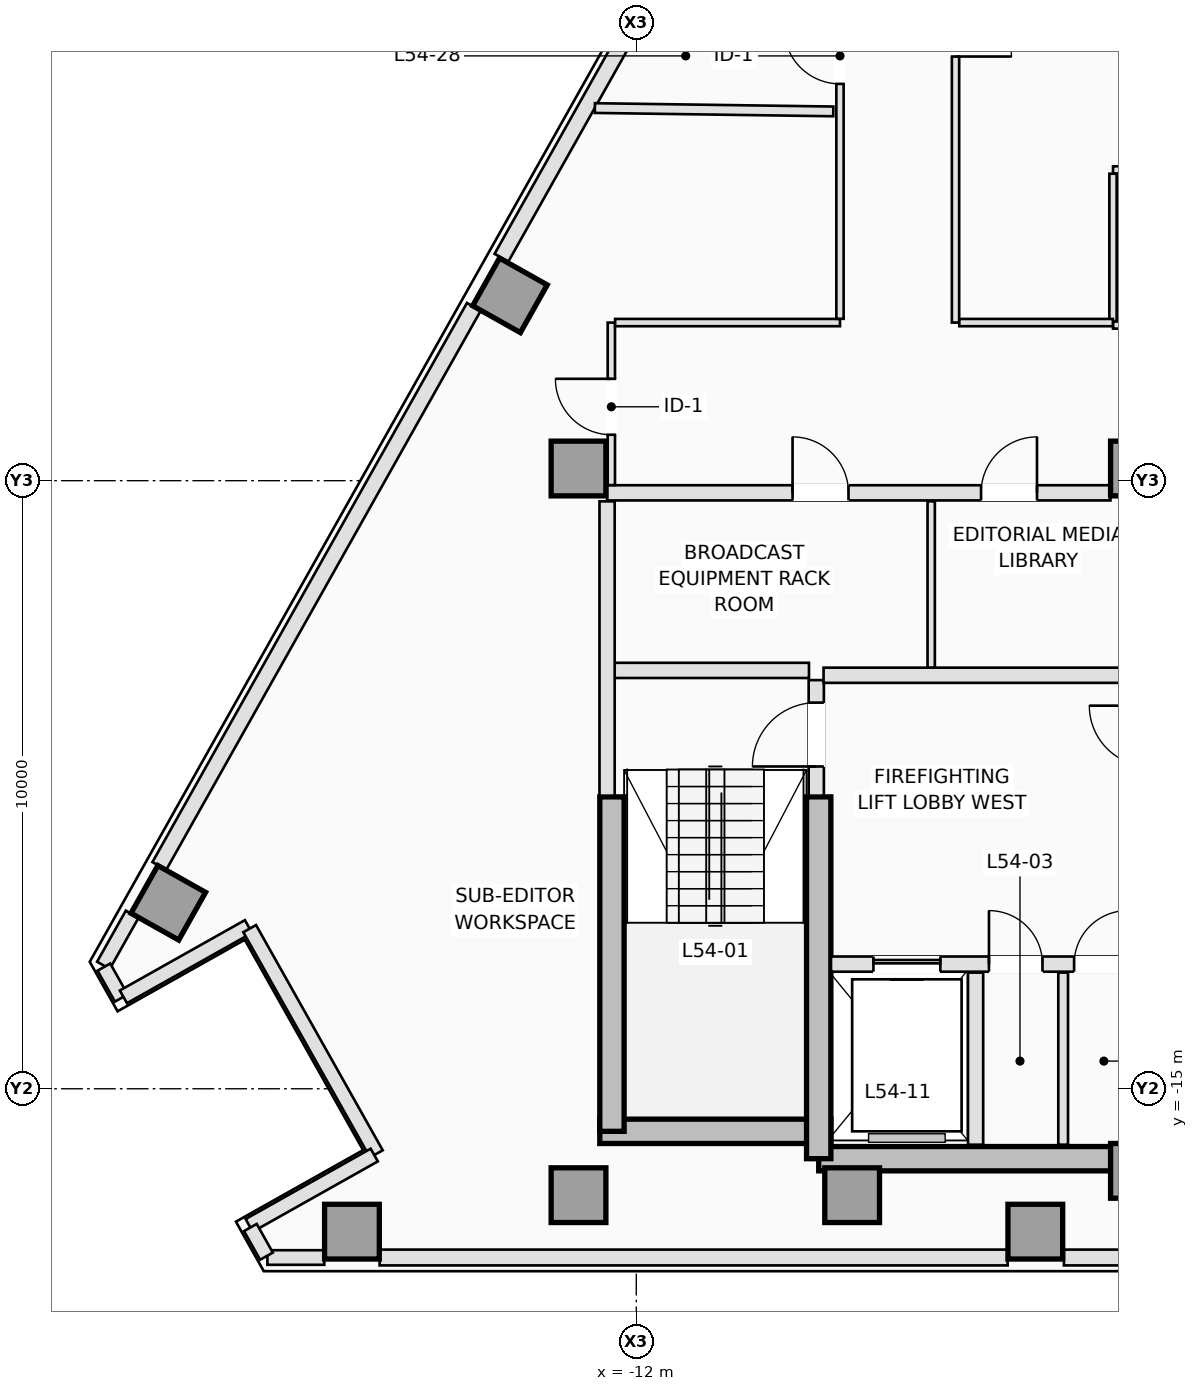
"""IFC4 building model, lengths in metres.
Left out: names, types, materials, properties, quantities, classifications, styles, units other than length and angle.
Written with IfcOpenShell. Run it as: python <this file> out.ifc"""

import sys

from ifc_helpers import new_model, si_unit, direction, frame, frame_2d, origin, origin_2d, place, context, subcontext, project, spatial, rectangle, extrude, element, fill, save


model = new_model("IFC4")
c1 = context("Model", 3, precision=1e-05, world=origin(), true_north=direction((0.0, 1.0)))
c2 = subcontext(c1, "Body", "Model", "MODEL_VIEW")
j1 = project(units=[si_unit("LENGTHUNIT", "METRE"), si_unit("PLANEANGLEUNIT", "RADIAN")], contexts=[c1])
p1 = place(None, origin())
s1 = spatial("IfcSite", under=j1, at=p1, CompositionType="ELEMENT")
p2 = place(p1, origin())
s2 = spatial("IfcBuilding", under=s1, at=p2, CompositionType="ELEMENT")
p3 = place(p2, frame((0.0, 0.0, 197.4)))
s3 = spatial("IfcBuildingStorey", under=s2, at=p3, CompositionType="ELEMENT", Elevation=197.4)
p4 = place(p3, frame((-12.6, -15.7, 0.0), z_axis=(0.0, 0.0, 1.0), x_axis=(1.0, 0.0, 0.0)))
e1 = element("IfcWall", 1, at=p4, inside=s3, PredefinedType="SHEAR", context=c2, shape_type="SweptSolid", body=[
    extrude(rectangle(XDim=3.8, YDim=0.4, at=frame_2d((1.9, 0.0))), origin(), (0.0, 0.0, 1.0), 3.5),
])
p5 = place(p3, frame((-9.0, -16.15, 0.0), z_axis=(0.0, 0.0, 1.0), x_axis=(1.0, 0.0, 0.0)))
e2 = element("IfcWall", 2, at=p5, inside=s3, PredefinedType="SHEAR", context=c2, shape_type="SweptSolid", body=[
    extrude(rectangle(XDim=5.25, YDim=0.4, at=frame_2d((2.625, 0.0))), origin(), (0.0, 0.0, 1.0), 3.5),
])
p6 = place(p3, frame((-12.4, -15.7, 0.0), z_axis=(0.0, 0.0, 1.0), x_axis=(0.0, 1.0, 0.0)))
e3 = element("IfcWall", 3, at=p6, inside=s3, PredefinedType="SHEAR", context=c2, shape_type="SweptSolid", body=[
    extrude(rectangle(XDim=5.5, YDim=0.4, at=frame_2d((2.75, 0.0))), origin(), (0.0, 0.0, 1.0), 3.5),
])
p7 = place(p3, frame((-9.0, -16.15, 0.0), z_axis=(0.0, 0.0, 1.0), x_axis=(0.0, 1.0, 0.0)))
e4 = element("IfcWall", 4, at=p7, inside=s3, PredefinedType="SHEAR", context=c2, shape_type="SweptSolid", body=[
    extrude(rectangle(XDim=5.95, YDim=0.4, at=frame_2d((2.975, 0.0))), origin(), (0.0, 0.0, 1.0), 3.5),
])
for number, where, z_axis, x_axis in (
    (5, (-12.95, -16.75, 0.0), (0.0, 0.0, 1.0), (1.0, 0.0, 0.0)),
    (6, (-8.45, -16.75, 0.0), (0.0, 0.0, 1.0), (1.0, 0.0, 0.0)),
    (7, (-3.75, -16.35, 0.0), (0.0, 0.0, 1.0), (1.0, 0.0, 0.0)),
    (8, (-12.95, -4.8, 0.0), (0.0, 0.0, 1.0), (1.0, 0.0, 0.0)),
    (9, (-3.75, -4.8, 0.0), (0.0, 0.0, 1.0), (1.0, 0.0, 0.0)),
    (10, (-16.676, -17.35, 0.0), (0.0, 0.0, 1.0), (0.0, 1.0, 0.0)),
    (11, (-5.438, -17.35, 0.0), (0.0, 0.0, 1.0), (0.0, 1.0, 0.0)),
    (12, (-14.077, -1.952, 0.0), (0.0, 0.0, 1.0), (-0.872, 0.49, 0.0)),
    (13, (-19.697, -11.942, 0.0), (0.0, 0.0, 1.0), (-0.872, 0.49, 0.0)),
):
    element("IfcColumn", number, at=place(p3, frame(where, z_axis=z_axis, x_axis=x_axis)), inside=s3, PredefinedType="COLUMN", context=c2, shape_type="SweptSolid", body=[
        extrude(rectangle(XDim=0.9, YDim=0.9, at=origin_2d()), origin(), (0.0, 0.0, 1.0), 3.5),
    ])
p8 = place(p3, frame((-17.131, -17.775, 0.0), z_axis=(0.0, 0.0, 1.0), x_axis=(-1.0, 0.0, 0.0)))
e14 = element("IfcWall", 14, at=p8, inside=s3, PredefinedType="STANDARD", context=c2, shape_type="SweptSolid", body=[
    extrude(rectangle(XDim=0.935, YDim=0.24, at=frame_2d((0.468, 0.0))), origin(), (0.0, 0.0, 1.0), 3.25),
])
p9 = place(p3, frame((-5.893, -17.775, 0.0), z_axis=(0.0, 0.0, 1.0), x_axis=(-1.0, 0.0, 0.0)))
e15 = element("IfcWall", 15, at=p9, inside=s3, PredefinedType="STANDARD", context=c2, shape_type="SweptSolid", body=[
    extrude(rectangle(XDim=10.328, YDim=0.26, at=frame_2d((5.164, 0.0))), origin(), (0.0, 0.0, 1.0), 3.25),
])
p10 = place(p3, frame((-0.662, -17.775, 0.0), z_axis=(0.0, 0.0, 1.0), x_axis=(-1.0, 0.0, 0.0)))
e16 = element("IfcWall", 16, at=p10, inside=s3, PredefinedType="STANDARD", context=c2, shape_type="SweptSolid", body=[
    extrude(rectangle(XDim=4.305, YDim=0.26, at=frame_2d((2.153, 0.0))), origin(), (0.0, 0.0, 1.0), 3.25),
])
p11 = place(p3, frame((-20.762, -12.97, 0.0), z_axis=(0.0, 0.0, 1.0), x_axis=(0.490345412687, 0.87152818443, 0.0)))
e17 = element("IfcWall", 17, at=p11, inside=s3, PredefinedType="STANDARD", context=c2, shape_type="SweptSolid", body=[
    extrude(rectangle(XDim=0.964, YDim=0.24, at=frame_2d((0.482, 0.0))), origin(), (0.0, 0.0, 1.0), 3.25),
])
p12 = place(p3, frame((-19.844, -11.337, 0.0), z_axis=(0.0, 0.0, 1.0), x_axis=(0.490246958575, 0.871583570066, 0.0)))
e18 = element("IfcWall", 18, at=p12, inside=s3, PredefinedType="STANDARD", context=c2, shape_type="SweptSolid", body=[
    extrude(rectangle(XDim=10.552, YDim=0.26, at=frame_2d((5.276, 0.0))), origin(), (0.0, 0.0, 1.0), 3.25),
])
p13 = place(p3, frame((-14.217, -1.334, 0.0), z_axis=(0.0, 0.0, 1.0), x_axis=(0.490261239633, 0.871575537125, 0.0)))
e19 = element("IfcWall", 19, at=p13, inside=s3, PredefinedType="STANDARD", context=c2, shape_type="SweptSolid", body=[
    extrude(rectangle(XDim=4.388, YDim=0.26, at=frame_2d((2.194, 0.0))), origin(), (0.0, 0.0, 1.0), 3.25),
])
p14 = place(p3, frame((-20.755, -12.999, 0.0), z_axis=(0.0, 0.0, 1.0), x_axis=(0.490320776404, -0.871542045014, 0.0)))
e20 = element("IfcWall", 20, at=p14, inside=s3, PredefinedType="STANDARD", context=c2, shape_type="SweptSolid", body=[
    extrude(rectangle(XDim=0.584, YDim=0.24, at=frame_2d((0.292, 0.0))), origin(), (0.0, 0.0, 1.0), 3.25),
])
p15 = place(p3, frame((-20.434, -13.489, 0.0), z_axis=(0.0, 0.0, 1.0), x_axis=(0.871578299909, 0.490256327984, 0.0)))
e21 = element("IfcWall", 21, at=p15, inside=s3, PredefinedType="STANDARD", context=c2, shape_type="SweptSolid", body=[
    extrude(rectangle(XDim=2.36, YDim=0.24, at=frame_2d((1.18, 0.0))), origin(), (0.0, 0.0, 1.0), 3.25),
])
p16 = place(p3, frame((-18.358, -12.366, 0.0), z_axis=(0.0, 0.0, 1.0), x_axis=(0.49027487746, -0.871567865706, 0.0)))
e22 = element("IfcWall", 22, at=p16, inside=s3, PredefinedType="STANDARD", context=c2, shape_type="SweptSolid", body=[
    extrude(rectangle(XDim=4.25, YDim=0.24, at=frame_2d((2.125, 0.0))), origin(), (0.0, 0.0, 1.0), 2.722),
])
p17 = place(p3, frame((-16.309, -16.09, 0.0), z_axis=(0.0, 0.0, 1.0), x_axis=(-0.871578299909, -0.490256327984, 0.0)))
e23 = element("IfcWall", 23, at=p17, inside=s3, PredefinedType="STANDARD", context=c2, shape_type="SweptSolid", body=[
    extrude(rectangle(XDim=2.36, YDim=0.24, at=frame_2d((1.18, 0.0))), origin(), (0.0, 0.0, 1.0), 3.25),
])
p18 = place(p3, frame((-18.346, -17.282, 0.0), z_axis=(0.0, 0.0, 1.0), x_axis=(0.49038986747, -0.87150317147, 0.0)))
e24 = element("IfcWall", 24, at=p18, inside=s3, PredefinedType="STANDARD", context=c2, shape_type="SweptSolid", body=[
    extrude(rectangle(XDim=0.541, YDim=0.24, at=frame_2d((0.271, 0.0))), origin(), (0.0, 0.0, 1.0), 3.25),
])
p19 = place(p3, frame((-9.04, -10.18, 0.0), z_axis=(0.0, 0.0, 1.0), x_axis=(0.0, 1.0, 0.0)))
e25 = element("IfcWall", 25, at=p19, inside=s3, PredefinedType="PARTITIONING", context=c2, shape_type="SweptSolid", body=[
    extrude(rectangle(XDim=1.9, YDim=0.25, at=frame_2d((0.95, 0.0))), origin(), (0.0, 0.0, 1.0), 3.25),
])
p20 = place(p19, frame((0.48, 0.0, 0.0)))
e26 = element("IfcOpeningElement", 26, at=p20, cuts=e25, PredefinedType="OPENING", context=c2, shape_type="SweptSolid", body=[
    extrude(rectangle(XDim=1.05, YDim=2.15, at=frame_2d((0.525, 1.075))), frame((0.0, 0.135, 0.0), z_axis=(0.0, -1.0, 0.0), x_axis=(1.0, 0.0, 0.0)), (0.0, 0.0, 1.0), 0.27),
])
p21 = place(p3, frame((-12.38, -8.12, 0.0), z_axis=(0.0, 0.0, 1.0), x_axis=(1.0, 0.0, 0.0)))
e27 = element("IfcWall", 27, at=p21, inside=s3, PredefinedType="PARTITIONING", context=c2, shape_type="SweptSolid", body=[
    extrude(rectangle(XDim=3.22, YDim=0.25, at=frame_2d((1.61, 0.0))), origin(), (0.0, 0.0, 1.0), 3.25),
])
p22 = place(p3, frame((-12.48, -10.18, 0.0), z_axis=(0.0, 0.0, 1.0), x_axis=(0.0, 1.0, 0.0)))
e28 = element("IfcWall", 28, at=p22, inside=s3, PredefinedType="PARTITIONING", context=c2, shape_type="SweptSolid", body=[
    extrude(rectangle(XDim=4.84, YDim=0.25, at=frame_2d((2.42, 0.0))), origin(), (0.0, 0.0, 1.0), 3.25),
])
p23 = place(p3, frame((-8.798, -12.95, 0.0), z_axis=(0.0, 0.0, 1.0), x_axis=(1.0, 0.0, 0.0)))
e29 = element("IfcWall", 29, at=p23, inside=s3, PredefinedType="PARTITIONING", context=c2, shape_type="SweptSolid", body=[
    extrude(rectangle(XDim=5.118, YDim=0.25, at=frame_2d((2.559, 0.0))), origin(), (0.0, 0.0, 1.0), 3.25),
])
p24 = place(p23, frame((0.698, 0.0, 0.0)))
e30 = element("IfcOpeningElement", 30, at=p24, cuts=e29, PredefinedType="OPENING", context=c2, shape_type="SweptSolid", body=[
    extrude(rectangle(XDim=1.1, YDim=2.15, at=frame_2d((0.55, 1.075))), frame((0.0, 0.135, 0.0), z_axis=(0.0, -1.0, 0.0), x_axis=(1.0, 0.0, 0.0)), (0.0, 0.0, 1.0), 0.27),
])
p25 = place(p23, frame((2.598, 0.0, 0.0)))
e31 = element("IfcOpeningElement", 31, at=p25, cuts=e29, PredefinedType="OPENING", context=c2, shape_type="SweptSolid", body=[
    extrude(rectangle(XDim=0.88, YDim=2.1, at=frame_2d((0.44, 1.05))), frame((0.0, 0.135, 0.0), z_axis=(0.0, -1.0, 0.0), x_axis=(1.0, 0.0, 0.0)), (0.0, 0.0, 1.0), 0.27),
])
p26 = place(p23, frame((3.998, 0.0, 0.0)))
e32 = element("IfcOpeningElement", 32, at=p26, cuts=e29, PredefinedType="OPENING", context=c2, shape_type="SweptSolid", body=[
    extrude(rectangle(XDim=0.88, YDim=2.1, at=frame_2d((0.44, 1.05))), frame((0.0, 0.135, 0.0), z_axis=(0.0, -1.0, 0.0), x_axis=(1.0, 0.0, 0.0)), (0.0, 0.0, 1.0), 0.27),
])
p27 = place(p3, frame((-6.42, -15.92, 0.0), z_axis=(0.0, 0.0, 1.0), x_axis=(0.0, 1.0, 0.0)))
e33 = element("IfcWall", 33, at=p27, inside=s3, PredefinedType="PARTITIONING", context=c2, shape_type="SweptSolid", body=[
    extrude(rectangle(XDim=2.83, YDim=0.25, at=frame_2d((1.415, 0.0))), origin(), (0.0, 0.0, 1.0), 3.25),
])
p28 = place(p3, frame((-4.98, -15.92, 0.0), z_axis=(0.0, 0.0, 1.0), x_axis=(0.0, 1.0, 0.0)))
e34 = element("IfcWall", 34, at=p28, inside=s3, PredefinedType="PARTITIONING", context=c2, shape_type="SweptSolid", body=[
    extrude(rectangle(XDim=2.83, YDim=0.16, at=frame_2d((1.415, 0.0))), origin(), (0.0, 0.0, 1.0), 3.25),
])
p29 = place(p3, frame((-8.92, -8.2, 0.0), z_axis=(0.0, 0.0, 1.0), x_axis=(1.0, 0.0, 0.0)))
e35 = element("IfcWall", 35, at=p29, inside=s3, PredefinedType="PARTITIONING", context=c2, shape_type="SweptSolid", body=[
    extrude(rectangle(XDim=5.24, YDim=0.25, at=frame_2d((2.62, 0.0))), origin(), (0.0, 0.0, 1.0), 3.25),
])
p30 = place(p3, frame((-12.48, -5.2, 0.0), z_axis=(0.0, 0.0, 1.0), x_axis=(1.0, 0.0, 0.0)))
e36 = element("IfcWall", 36, at=p30, inside=s3, PredefinedType="PARTITIONING", context=c2, shape_type="SweptSolid", body=[
    extrude(rectangle(XDim=8.278, YDim=0.25, at=frame_2d((4.139, 0.0))), origin(), (0.0, 0.0, 1.0), 3.25),
])
p31 = place(p30, frame((3.05, 0.0, 0.0)))
e37 = element("IfcOpeningElement", 37, at=p31, cuts=e36, PredefinedType="OPENING", context=c2, shape_type="SweptSolid", body=[
    extrude(rectangle(XDim=0.92, YDim=2.12, at=frame_2d((0.46, 1.06))), frame((0.0, 0.135, 0.0), z_axis=(0.0, -1.0, 0.0), x_axis=(1.0, 0.0, 0.0)), (0.0, 0.0, 1.0), 0.27),
])
p32 = place(p30, frame((6.15, 0.0, 0.0)))
e38 = element("IfcOpeningElement", 38, at=p32, cuts=e36, PredefinedType="OPENING", context=c2, shape_type="SweptSolid", body=[
    extrude(rectangle(XDim=0.92, YDim=2.12, at=frame_2d((0.46, 1.06))), frame((0.0, 0.135, 0.0), z_axis=(0.0, -1.0, 0.0), x_axis=(1.0, 0.0, 0.0)), (0.0, 0.0, 1.0), 0.27),
])
p33 = place(p3, frame((-7.15, -8.073, 0.0), z_axis=(0.0, 0.0, 1.0), x_axis=(0.0, 1.0, 0.0)))
e39 = element("IfcWall", 39, at=p33, inside=s3, PredefinedType="PARTITIONING", context=c2, shape_type="SweptSolid", body=[
    extrude(rectangle(XDim=2.733, YDim=0.12, at=frame_2d((1.366, 0.0))), origin(), (0.0, 0.0, 1.0), 3.25),
])
p34 = place(p3, frame((-4.16, -2.44, 0.0), z_axis=(0.0, 0.0, 1.0), x_axis=(1.0, 0.0, 0.0)))
e40 = element("IfcWall", 40, at=p34, inside=s3, PredefinedType="PARTITIONING", context=c2, shape_type="SweptSolid", body=[
    extrude(rectangle(XDim=2.62, YDim=0.12, at=frame_2d((1.31, 0.0))), origin(), (0.0, 0.0, 1.0), 2.943),
])
p35 = place(p34, frame((0.82, 0.0, 0.0)))
e41 = element("IfcOpeningElement", 41, at=p35, cuts=e40, PredefinedType="OPENING", context=c2, shape_type="SweptSolid", body=[
    extrude(rectangle(XDim=0.9, YDim=2.12, at=frame_2d((0.45, 1.06))), frame((0.0, 0.07, 0.0), z_axis=(0.0, -1.0, 0.0), x_axis=(1.0, 0.0, 0.0)), (0.0, 0.0, 1.0), 0.14),
])
p36 = place(p3, frame((-4.16, 0.11, 0.0), z_axis=(0.0, 0.0, 1.0), x_axis=(1.0, 0.0, 0.0)))
e42 = element("IfcWall", 42, at=p36, inside=s3, PredefinedType="PARTITIONING", context=c2, shape_type="SweptSolid", body=[
    extrude(rectangle(XDim=2.62, YDim=0.12, at=frame_2d((1.31, 0.0))), origin(), (0.0, 0.0, 1.0), 3.25),
])
p37 = place(p3, frame((-4.16, -2.378, 0.0), z_axis=(0.0, 0.0, 1.0), x_axis=(0.0, 1.0, 0.0)))
e43 = element("IfcWall", 43, at=p37, inside=s3, PredefinedType="PARTITIONING", context=c2, shape_type="SweptSolid", body=[
    extrude(rectangle(XDim=2.426, YDim=0.12, at=frame_2d((1.213, 0.0))), origin(), (0.0, 0.0, 1.0), 3.25),
])
p38 = place(p3, frame((-12.41, -5.073, 0.0), z_axis=(0.0, 0.0, 1.0), x_axis=(0.0, 1.0, 0.0)))
e44 = element("IfcWall", 44, at=p38, inside=s3, PredefinedType="PARTITIONING", context=c2, shape_type="SweptSolid", body=[
    extrude(rectangle(XDim=2.673, YDim=0.12, at=frame_2d((1.336, 0.0))), origin(), (0.0, 0.0, 1.0), 3.25),
])
p39 = place(p38, frame((0.828, 0.0, 0.0)))
e45 = element("IfcOpeningElement", 45, at=p39, cuts=e44, PredefinedType="OPENING", context=c2, shape_type="SweptSolid", body=[
    extrude(rectangle(XDim=0.92, YDim=2.12, at=frame_2d((0.46, 1.06))), frame((0.0, 0.07, 0.0), z_axis=(0.0, -1.0, 0.0), x_axis=(1.0, 0.0, 0.0)), (0.0, 0.0, 1.0), 0.14),
])
p40 = place(p3, frame((-12.348, -2.4, 0.0), z_axis=(0.0, 0.0, 1.0), x_axis=(1.0, 0.0, 0.0)))
e46 = element("IfcWall", 46, at=p40, inside=s3, PredefinedType="PARTITIONING", context=c2, shape_type="SweptSolid", body=[
    extrude(rectangle(XDim=3.698, YDim=0.12, at=frame_2d((1.849, 0.0))), origin(), (0.0, 0.0, 1.0), 3.25),
])
p41 = place(p3, frame((-8.65, -2.338, 0.0), z_axis=(0.0, 0.0, 1.0), x_axis=(0.0, 1.0, 0.0)))
e47 = element("IfcWall", 47, at=p41, inside=s3, PredefinedType="PARTITIONING", context=c2, shape_type="SweptSolid", body=[
    extrude(rectangle(XDim=8.525, YDim=0.12, at=frame_2d((4.262, 0.0))), origin(), (0.0, 0.0, 1.0), 3.25),
])
p42 = place(p41, frame((6.109, 0.0, 0.0)))
e48 = element("IfcOpeningElement", 48, at=p42, cuts=e47, PredefinedType="OPENING", context=c2, shape_type="SweptSolid", body=[
    extrude(rectangle(XDim=0.92, YDim=2.12, at=frame_2d((0.46, 1.06))), frame((0.0, 0.07, 0.0), z_axis=(0.0, -1.0, 0.0), x_axis=(1.0, 0.0, 0.0)), (0.0, 0.0, 1.0), 0.14),
])
p43 = place(p41, frame((3.863, 0.0, 0.0)))
e49 = element("IfcOpeningElement", 49, at=p43, cuts=e47, PredefinedType="OPENING", context=c2, shape_type="SweptSolid", body=[
    extrude(rectangle(XDim=0.92, YDim=2.12, at=frame_2d((0.46, 1.06))), frame((0.0, 0.07, 0.0), z_axis=(0.0, -1.0, 0.0), x_axis=(1.0, 0.0, 0.0)), (0.0, 0.0, 1.0), 0.14),
])
p44 = place(p3, frame((-6.75, 7.208, 0.0), z_axis=(0.0, 0.0, 1.0), x_axis=(0.0, -1.0, 0.0)))
e50 = element("IfcWall", 50, at=p44, inside=s3, PredefinedType="PARTITIONING", context=c2, shape_type="SweptSolid", body=[
    extrude(rectangle(XDim=9.608, YDim=0.12, at=frame_2d((4.804, 0.0))), origin(), (0.0, 0.0, 1.0), 3.25),
])
p45 = place(p44, frame((4.313, 0.0, 0.0)))
e51 = element("IfcOpeningElement", 51, at=p45, cuts=e50, PredefinedType="OPENING", context=c2, shape_type="SweptSolid", body=[
    extrude(rectangle(XDim=0.92, YDim=2.12, at=frame_2d((0.46, 1.06))), frame((0.0, 0.07, 0.0), z_axis=(0.0, -1.0, 0.0), x_axis=(1.0, 0.0, 0.0)), (0.0, 0.0, 1.0), 0.14),
])
p46 = place(p3, frame((-6.688, -2.4, 0.0), z_axis=(0.0, 0.0, 1.0), x_axis=(1.0, 0.0, 0.0)))
e52 = element("IfcWall", 52, at=p46, inside=s3, PredefinedType="PARTITIONING", context=c2, shape_type="SweptSolid", body=[
    extrude(rectangle(XDim=2.526, YDim=0.12, at=frame_2d((1.263, 0.0))), origin(), (0.0, 0.0, 1.0), 3.25),
])
p47 = place(p3, frame((-8.76, 1.073, 0.0), z_axis=(0.0, 0.0, 1.0), x_axis=(-0.999901887135, 0.014007715871, 0.0)))
e53 = element("IfcWall", 53, at=p47, inside=s3, PredefinedType="PARTITIONING", context=c2, shape_type="SweptSolid", body=[
    extrude(rectangle(XDim=3.922, YDim=0.16, at=frame_2d((1.961, 0.0))), origin(), (0.0, 0.0, 1.0), 3.25),
])
p48 = place(p24, origin())
e54 = element("IfcDoor", 54, at=p48, inside=s3, OperationType="SLIDING_TO_LEFT", PredefinedType="DOOR", context=c2, shape_type="SweptSolid", body=[
    extrude(rectangle(XDim=1.1, YDim=2.15, at=frame_2d((0.55, 1.075))), frame((0.0, 0.025, 0.0), z_axis=(0.0, -1.0, 0.0), x_axis=(1.0, 0.0, 0.0)), (0.0, 0.0, 1.0), 0.05),
])
fill(e30, e54)
p49 = place(p20, origin())
e55 = element("IfcDoor", 55, at=p49, inside=s3, OperationType="SINGLE_SWING_LEFT", PredefinedType="DOOR", context=c2, shape_type="SweptSolid", body=[
    extrude(rectangle(XDim=1.05, YDim=2.15, at=frame_2d((0.525, 1.075))), frame((0.0, 0.025, 0.0), z_axis=(0.0, -1.0, 0.0), x_axis=(1.0, 0.0, 0.0)), (0.0, 0.0, 1.0), 0.05),
])
fill(e26, e55)
p50 = place(p25, origin())
e56 = element("IfcDoor", 56, at=p50, inside=s3, OperationType="SINGLE_SWING_LEFT", PredefinedType="TRAPDOOR", context=c2, shape_type="SweptSolid", body=[
    extrude(rectangle(XDim=0.88, YDim=2.1, at=frame_2d((0.44, 1.05))), frame((0.0, 0.025, 0.0), z_axis=(0.0, -1.0, 0.0), x_axis=(1.0, 0.0, 0.0)), (0.0, 0.0, 1.0), 0.05),
])
fill(e31, e56)
p51 = place(p26, origin())
e57 = element("IfcDoor", 57, at=p51, inside=s3, OperationType="SINGLE_SWING_RIGHT", PredefinedType="TRAPDOOR", context=c2, shape_type="SweptSolid", body=[
    extrude(rectangle(XDim=0.88, YDim=2.1, at=frame_2d((0.44, 1.05))), frame((0.0, 0.025, 0.0), z_axis=(0.0, -1.0, 0.0), x_axis=(1.0, 0.0, 0.0)), (0.0, 0.0, 1.0), 0.05),
])
fill(e32, e57)
p52 = place(p31, origin())
e58 = element("IfcDoor", 58, at=p52, inside=s3, OperationType="SINGLE_SWING_LEFT", PredefinedType="DOOR", context=c2, shape_type="SweptSolid", body=[
    extrude(rectangle(XDim=0.92, YDim=2.12, at=frame_2d((0.46, 1.06))), frame((0.0, 0.025, 0.0), z_axis=(0.0, -1.0, 0.0), x_axis=(1.0, 0.0, 0.0)), (0.0, 0.0, 1.0), 0.05),
])
fill(e37, e58)
p53 = place(p32, origin())
e59 = element("IfcDoor", 59, at=p53, inside=s3, OperationType="SINGLE_SWING_RIGHT", PredefinedType="DOOR", context=c2, shape_type="SweptSolid", body=[
    extrude(rectangle(XDim=0.92, YDim=2.12, at=frame_2d((0.46, 1.06))), frame((0.0, 0.025, 0.0), z_axis=(0.0, -1.0, 0.0), x_axis=(1.0, 0.0, 0.0)), (0.0, 0.0, 1.0), 0.05),
])
fill(e38, e59)
p54 = place(p45, origin())
e60 = element("IfcDoor", 60, at=p54, inside=s3, OperationType="SINGLE_SWING_RIGHT", PredefinedType="DOOR", context=c2, shape_type="SweptSolid", body=[
    extrude(rectangle(XDim=0.92, YDim=2.12, at=frame_2d((0.46, 1.06))), frame((0.0, 0.025, 0.0), z_axis=(0.0, -1.0, 0.0), x_axis=(1.0, 0.0, 0.0)), (0.0, 0.0, 1.0), 0.05),
])
fill(e51, e60)
p55 = place(p43, origin())
e61 = element("IfcDoor", 61, at=p55, inside=s3, OperationType="SINGLE_SWING_RIGHT", PredefinedType="DOOR", context=c2, shape_type="SweptSolid", body=[
    extrude(rectangle(XDim=0.92, YDim=2.12, at=frame_2d((0.46, 1.06))), frame((0.0, 0.025, 0.0), z_axis=(0.0, -1.0, 0.0), x_axis=(1.0, 0.0, 0.0)), (0.0, 0.0, 1.0), 0.05),
])
fill(e49, e61)
p56 = place(p39, origin())
e62 = element("IfcDoor", 62, at=p56, inside=s3, OperationType="SINGLE_SWING_RIGHT", PredefinedType="DOOR", context=c2, shape_type="SweptSolid", body=[
    extrude(rectangle(XDim=0.92, YDim=2.12, at=frame_2d((0.46, 1.06))), frame((0.0, 0.025, 0.0), z_axis=(0.0, -1.0, 0.0), x_axis=(1.0, 0.0, 0.0)), (0.0, 0.0, 1.0), 0.05),
])
fill(e45, e62)
save(model, sys.argv[1])
